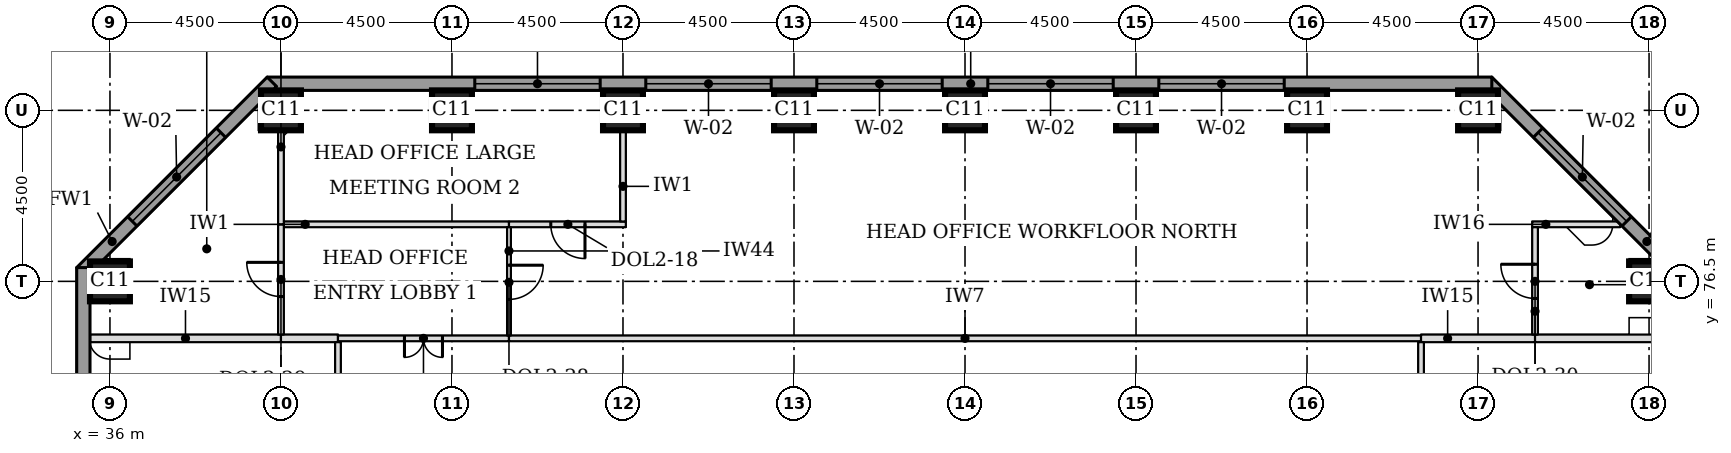
"""IFC4 building model, lengths in metres.
Left out: names, types, materials, properties, quantities, classifications, styles, units other than length and angle.
Written with IfcOpenShell. Run it as: python <this file> out.ifc"""

import sys

from ifc_helpers import new_model, si_unit, direction, frame, frame_2d, origin, origin_2d, place, context, subcontext, project, spatial, rectangle, extrude, element, fill, save


model = new_model("IFC4")
c1 = context("Model", 3, precision=1e-05, world=origin(), true_north=direction((0.0, 1.0)))
c2 = subcontext(c1, "Body", "Model", "MODEL_VIEW")
j1 = project(units=[si_unit("LENGTHUNIT", "METRE"), si_unit("PLANEANGLEUNIT", "RADIAN")], contexts=[c1])
p1 = place(None, origin())
s1 = spatial("IfcSite", under=j1, at=p1, CompositionType="ELEMENT")
p2 = place(p1, origin())
s2 = spatial("IfcBuilding", under=s1, at=p2, CompositionType="ELEMENT")
p3 = place(p2, frame((0.0, 0.0, 86.3)))
s3 = spatial("IfcBuildingStorey", under=s2, at=p3, CompositionType="ELEMENT", Elevation=86.3)
for number, where, z_axis, x_axis in (
    (1, (36.0, 76.5, 0.0), (0.0, 0.0, 1.0), (1.0, 0.0, 0.0)),
    (2, (76.5, 76.5, 0.0), (0.0, 0.0, 1.0), (1.0, 0.0, 0.0)),
    (3, (40.5, 81.0, 0.0), (0.0, 0.0, 1.0), (1.0, 0.0, 0.0)),
    (4, (45.0, 81.0, 0.0), (0.0, 0.0, 1.0), (1.0, 0.0, 0.0)),
    (5, (49.5, 81.0, 0.0), (0.0, 0.0, 1.0), (1.0, 0.0, 0.0)),
    (6, (54.0, 81.0, 0.0), (0.0, 0.0, 1.0), (1.0, 0.0, 0.0)),
    (7, (58.5, 81.0, 0.0), (0.0, 0.0, 1.0), (1.0, 0.0, 0.0)),
    (8, (63.0, 81.0, 0.0), (0.0, 0.0, 1.0), (1.0, 0.0, 0.0)),
    (9, (67.5, 81.0, 0.0), (0.0, 0.0, 1.0), (1.0, 0.0, 0.0)),
    (10, (72.0, 81.0, 0.0), (0.0, 0.0, 1.0), (1.0, 0.0, 0.0)),
):
    element("IfcColumn", number, at=place(p3, frame(where, z_axis=z_axis, x_axis=x_axis)), inside=s3, PredefinedType="COLUMN", context=c2, shape_type="SweptSolid", body=[
        extrude(rectangle(XDim=1.05, YDim=1.05, at=origin_2d()), origin(), (0.0, 0.0, 1.0), 3.7),
    ])
p4 = place(p3, frame((77.251, 76.739, 0.0), z_axis=(0.0, 0.0, 1.0), x_axis=(-0.707106781187, 0.707106781187, 0.0)))
e11 = element("IfcWall", 11, at=p4, inside=s3, PredefinedType="STANDARD", context=c2, shape_type="SweptSolid", body=[
    extrude(rectangle(XDim=7.089, YDim=0.35, at=frame_2d((3.544, 0.0))), origin(), (0.0, 0.0, 1.0), 3.525),
])
p5 = place(p4, frame((1.894, 0.0, 0.9)))
e12 = element("IfcOpeningElement", 12, at=p5, cuts=e11, PredefinedType="OPENING", context=c2, shape_type="SweptSolid", body=[
    extrude(rectangle(XDim=3.3, YDim=1.9, at=frame_2d((1.65, 0.95))), frame((0.0, 0.185, 0.0), z_axis=(0.0, -1.0, 0.0), x_axis=(1.0, 0.0, 0.0)), (0.0, 0.0, 1.0), 0.37),
])
p6 = place(p3, frame((72.362, 81.7, 0.0), z_axis=(0.0, 0.0, 1.0), x_axis=(-1.0, 0.0, 0.0)))
e13 = element("IfcWall", 13, at=p6, inside=s3, PredefinedType="STANDARD", context=c2, shape_type="SweptSolid", body=[
    extrude(rectangle(XDim=32.225, YDim=0.35, at=frame_2d((16.112, 0.0))), origin(), (0.0, 0.0, 1.0), 3.525),
])
p7 = place(p6, frame((5.462, 0.0, 0.9)))
e14 = element("IfcOpeningElement", 14, at=p7, cuts=e13, PredefinedType="OPENING", context=c2, shape_type="SweptSolid", body=[
    extrude(rectangle(XDim=3.3, YDim=1.9, at=frame_2d((1.65, 0.95))), frame((0.0, 0.185, 0.0), z_axis=(0.0, -1.0, 0.0), x_axis=(1.0, 0.0, 0.0)), (0.0, 0.0, 1.0), 0.37),
])
p8 = place(p6, frame((9.962, 0.0, 0.9)))
e15 = element("IfcOpeningElement", 15, at=p8, cuts=e13, PredefinedType="OPENING", context=c2, shape_type="SweptSolid", body=[
    extrude(rectangle(XDim=3.3, YDim=1.9, at=frame_2d((1.65, 0.95))), frame((0.0, 0.185, 0.0), z_axis=(0.0, -1.0, 0.0), x_axis=(1.0, 0.0, 0.0)), (0.0, 0.0, 1.0), 0.37),
])
p9 = place(p6, frame((14.462, 0.0, 0.9)))
e16 = element("IfcOpeningElement", 16, at=p9, cuts=e13, PredefinedType="OPENING", context=c2, shape_type="SweptSolid", body=[
    extrude(rectangle(XDim=3.3, YDim=1.9, at=frame_2d((1.65, 0.95))), frame((0.0, 0.185, 0.0), z_axis=(0.0, -1.0, 0.0), x_axis=(1.0, 0.0, 0.0)), (0.0, 0.0, 1.0), 0.37),
])
p10 = place(p6, frame((18.962, 0.0, 0.9)))
e17 = element("IfcOpeningElement", 17, at=p10, cuts=e13, PredefinedType="OPENING", context=c2, shape_type="SweptSolid", body=[
    extrude(rectangle(XDim=3.3, YDim=1.9, at=frame_2d((1.65, 0.95))), frame((0.0, 0.185, 0.0), z_axis=(0.0, -1.0, 0.0), x_axis=(1.0, 0.0, 0.0)), (0.0, 0.0, 1.0), 0.37),
])
p11 = place(p6, frame((23.462, 0.0, 0.9)))
e18 = element("IfcOpeningElement", 18, at=p11, cuts=e13, PredefinedType="OPENING", context=c2, shape_type="SweptSolid", body=[
    extrude(rectangle(XDim=3.3, YDim=1.9, at=frame_2d((1.65, 0.95))), frame((0.0, 0.185, 0.0), z_axis=(0.0, -1.0, 0.0), x_axis=(1.0, 0.0, 0.0)), (0.0, 0.0, 1.0), 0.37),
])
p12 = place(p3, frame((40.261, 81.751, 0.0), z_axis=(0.0, 0.0, 1.0), x_axis=(-0.707106781187, -0.707106781187, 0.0)))
e19 = element("IfcWall", 19, at=p12, inside=s3, PredefinedType="STANDARD", context=c2, shape_type="SweptSolid", body=[
    extrude(rectangle(XDim=7.089, YDim=0.35, at=frame_2d((3.544, 0.0))), origin(), (0.0, 0.0, 1.0), 3.525),
])
p13 = place(p12, frame((1.894, 0.0, 0.9)))
e20 = element("IfcOpeningElement", 20, at=p13, cuts=e19, PredefinedType="OPENING", context=c2, shape_type="SweptSolid", body=[
    extrude(rectangle(XDim=3.3, YDim=1.9, at=frame_2d((1.65, 0.95))), frame((0.0, 0.185, 0.0), z_axis=(0.0, -1.0, 0.0), x_axis=(1.0, 0.0, 0.0)), (0.0, 0.0, 1.0), 0.37),
])
p14 = place(p3, frame((35.3, 76.862, 0.0), z_axis=(0.0, 0.0, 1.0), x_axis=(0.0, -1.0, 0.0)))
e21 = element("IfcWall", 21, at=p14, inside=s3, PredefinedType="STANDARD", context=c2, shape_type="SweptSolid", body=[
    extrude(rectangle(XDim=13.337, YDim=0.35, at=frame_2d((6.669, 0.0))), origin(), (0.0, 0.0, 1.0), 3.525),
])
p15 = place(p14, frame((9.537, 0.0, 0.9)))
e22 = element("IfcOpeningElement", 22, at=p15, cuts=e21, PredefinedType="OPENING", context=c2, shape_type="SweptSolid", body=[
    extrude(rectangle(XDim=3.3, YDim=1.9, at=frame_2d((1.65, 0.95))), frame((0.0, 0.185, 0.0), z_axis=(0.0, -1.0, 0.0), x_axis=(1.0, 0.0, 0.0)), (0.0, 0.0, 1.0), 0.37),
])
p16 = place(p3, frame((35.475, 75.0, 0.0), z_axis=(0.0, 0.0, 1.0), x_axis=(1.0, 0.0, 0.0)))
e23 = element("IfcWall", 23, at=p16, inside=s3, PredefinedType="PARTITIONING", context=c2, shape_type="SweptSolid", body=[
    extrude(rectangle(XDim=5.025, YDim=0.2, at=frame_2d((2.512, 0.0))), origin(), (0.0, 0.0, 1.0), 3.55),
])
p17 = place(p3, frame((40.5, 75.0, 0.0), z_axis=(0.0, 0.0, 1.0), x_axis=(1.0, 0.0, 0.0)))
e24 = element("IfcWall", 24, at=p17, inside=s3, PredefinedType="PARTITIONING", context=c2, shape_type="SweptSolid", body=[
    extrude(rectangle(XDim=1.5, YDim=0.2, at=frame_2d((0.75, 0.0))), origin(), (0.0, 0.0, 1.0), 3.55),
])
p18 = place(p3, frame((42.0, 75.0, 0.0), z_axis=(0.0, 0.0, 1.0), x_axis=(1.0, 0.0, 0.0)))
e25 = element("IfcWall", 25, at=p18, inside=s3, PredefinedType="PARTITIONING", context=c2, shape_type="SweptSolid", body=[
    extrude(rectangle(XDim=4.5, YDim=0.15, at=frame_2d((2.25, 0.0))), origin(), (0.0, 0.0, 1.0), 3.55),
])
p19 = place(p18, frame((1.75, 0.0, 0.0)))
e26 = element("IfcOpeningElement", 26, at=p19, cuts=e25, PredefinedType="OPENING", context=c2, shape_type="SweptSolid", body=[
    extrude(rectangle(XDim=1.0, YDim=2.1, at=frame_2d((0.5, 1.05))), frame((0.0, 0.085, 0.0), z_axis=(0.0, -1.0, 0.0), x_axis=(1.0, 0.0, 0.0)), (0.0, 0.0, 1.0), 0.17),
])
p20 = place(p3, frame((46.5, 75.0, 0.0), z_axis=(0.0, 0.0, 1.0), x_axis=(1.0, 0.0, 0.0)))
e27 = element("IfcWall", 27, at=p20, inside=s3, PredefinedType="PARTITIONING", context=c2, shape_type="SweptSolid", body=[
    extrude(rectangle(XDim=24.0, YDim=0.15, at=frame_2d((12.0, 0.0))), origin(), (0.0, 0.0, 1.0), 3.55),
])
p21 = place(p3, frame((70.5, 75.0, 0.0), z_axis=(0.0, 0.0, 1.0), x_axis=(1.0, 0.0, 0.0)))
e28 = element("IfcWall", 28, at=p21, inside=s3, PredefinedType="PARTITIONING", context=c2, shape_type="SweptSolid", body=[
    extrude(rectangle(XDim=3.0, YDim=0.2, at=frame_2d((1.5, 0.0))), origin(), (0.0, 0.0, 1.0), 3.55),
])
p22 = place(p3, frame((73.5, 75.0, 0.0), z_axis=(0.0, 0.0, 1.0), x_axis=(1.0, 0.0, 0.0)))
e29 = element("IfcWall", 29, at=p22, inside=s3, PredefinedType="PARTITIONING", context=c2, shape_type="SweptSolid", body=[
    extrude(rectangle(XDim=3.525, YDim=0.2, at=frame_2d((1.762, 0.0))), origin(), (0.0, 0.0, 1.0), 3.55),
])
p23 = place(p3, frame((40.575, 78.0, 0.0), z_axis=(0.0, 0.0, 1.0), x_axis=(1.0, 0.0, 0.0)))
e30 = element("IfcWall", 30, at=p23, inside=s3, PredefinedType="PARTITIONING", context=c2, shape_type="SweptSolid", body=[
    extrude(rectangle(XDim=5.925, YDim=0.15, at=frame_2d((2.962, 0.0))), origin(), (0.0, 0.0, 1.0), 3.55),
])
p24 = place(p3, frame((46.5, 78.0, 0.0), z_axis=(0.0, 0.0, 1.0), x_axis=(1.0, 0.0, 0.0)))
e31 = element("IfcWall", 31, at=p24, inside=s3, PredefinedType="PARTITIONING", context=c2, shape_type="SweptSolid", body=[
    extrude(rectangle(XDim=3.075, YDim=0.15, at=frame_2d((1.538, 0.0))), origin(), (0.0, 0.0, 1.0), 3.55),
])
p25 = place(p24, frame((1.1, 0.0, 0.0)))
e32 = element("IfcOpeningElement", 32, at=p25, cuts=e31, PredefinedType="OPENING", context=c2, shape_type="SweptSolid", body=[
    extrude(rectangle(XDim=0.9, YDim=2.1, at=frame_2d((0.45, 1.05))), frame((0.0, 0.085, 0.0), z_axis=(0.0, -1.0, 0.0), x_axis=(1.0, 0.0, 0.0)), (0.0, 0.0, 1.0), 0.17),
])
p26 = place(p3, frame((73.425, 78.0, 0.0), z_axis=(0.0, 0.0, 1.0), x_axis=(1.0, 0.0, 0.0)))
e33 = element("IfcWall", 33, at=p26, inside=s3, PredefinedType="PARTITIONING", context=c2, shape_type="SweptSolid", body=[
    extrude(rectangle(XDim=2.317, YDim=0.15, at=frame_2d((1.159, 0.0))), origin(), (0.0, 0.0, 1.0), 3.55),
])
p27 = place(p3, frame((70.5, 46.6, 0.0), z_axis=(0.0, 0.0, 1.0), x_axis=(0.0, 1.0, 0.0)))
e34 = element("IfcWall", 34, at=p27, inside=s3, PredefinedType="PARTITIONING", context=c2, shape_type="SweptSolid", body=[
    extrude(rectangle(XDim=28.3, YDim=0.15, at=frame_2d((14.15, 0.0))), origin(), (0.0, 0.0, 1.0), 3.55),
])
p28 = place(p27, frame((13.65, 0.0, 0.0)))
e35 = element("IfcOpeningElement", 35, at=p28, cuts=e34, PredefinedType="OPENING", context=c2, shape_type="SweptSolid", body=[
    extrude(rectangle(XDim=1.0, YDim=2.1, at=frame_2d((0.5, 1.05))), frame((0.0, 0.085, 0.0), z_axis=(0.0, -1.0, 0.0), x_axis=(1.0, 0.0, 0.0)), (0.0, 0.0, 1.0), 0.17),
])
p29 = place(p3, frame((42.0, 57.075, 0.0), z_axis=(0.0, 0.0, 1.0), x_axis=(0.0, 1.0, 0.0)))
e36 = element("IfcWall", 36, at=p29, inside=s3, PredefinedType="PARTITIONING", context=c2, shape_type="SweptSolid", body=[
    extrude(rectangle(XDim=17.825, YDim=0.15, at=frame_2d((8.913, 0.0))), origin(), (0.0, 0.0, 1.0), 3.55),
])
p30 = place(p3, frame((46.5, 75.075, 0.0), z_axis=(0.0, 0.0, 1.0), x_axis=(0.0, 1.0, 0.0)))
e37 = element("IfcWall", 37, at=p30, inside=s3, PredefinedType="PARTITIONING", context=c2, shape_type="SweptSolid", body=[
    extrude(rectangle(XDim=2.85, YDim=0.1, at=frame_2d((1.425, 0.0))), origin(), (0.0, 0.0, 1.0), 3.022),
])
p31 = place(p30, frame((0.95, 0.0, 0.0)))
e38 = element("IfcOpeningElement", 38, at=p31, cuts=e37, PredefinedType="OPENING", context=c2, shape_type="SweptSolid", body=[
    extrude(rectangle(XDim=0.9, YDim=2.1, at=frame_2d((0.45, 1.05))), frame((0.0, 0.06, 0.0), z_axis=(0.0, -1.0, 0.0), x_axis=(1.0, 0.0, 0.0)), (0.0, 0.0, 1.0), 0.12),
])
p32 = place(p3, frame((40.5, 75.1, 0.0), z_axis=(0.0, 0.0, 1.0), x_axis=(0.0, 1.0, 0.0)))
e39 = element("IfcWall", 39, at=p32, inside=s3, PredefinedType="PARTITIONING", context=c2, shape_type="SweptSolid", body=[
    extrude(rectangle(XDim=2.9, YDim=0.15, at=frame_2d((1.45, 0.0))), origin(), (0.0, 0.0, 1.0), 3.55),
])
p33 = place(p32, frame((1.0, 0.0, 0.0)))
e40 = element("IfcOpeningElement", 40, at=p33, cuts=e39, PredefinedType="OPENING", context=c2, shape_type="SweptSolid", body=[
    extrude(rectangle(XDim=0.9, YDim=2.1, at=frame_2d((0.45, 1.05))), frame((0.0, 0.085, 0.0), z_axis=(0.0, -1.0, 0.0), x_axis=(1.0, 0.0, 0.0)), (0.0, 0.0, 1.0), 0.17),
])
p34 = place(p3, frame((73.5, 75.1, 0.0), z_axis=(0.0, 0.0, 1.0), x_axis=(0.0, 1.0, 0.0)))
e41 = element("IfcWall", 41, at=p34, inside=s3, PredefinedType="PARTITIONING", context=c2, shape_type="SweptSolid", body=[
    extrude(rectangle(XDim=2.825, YDim=0.15, at=frame_2d((1.413, 0.0))), origin(), (0.0, 0.0, 1.0), 3.55),
])
p35 = place(p34, frame((0.95, 0.0, 0.0)))
e42 = element("IfcOpeningElement", 42, at=p35, cuts=e41, PredefinedType="OPENING", context=c2, shape_type="SweptSolid", body=[
    extrude(rectangle(XDim=0.9, YDim=2.1, at=frame_2d((0.45, 1.05))), frame((0.0, 0.085, 0.0), z_axis=(0.0, -1.0, 0.0), x_axis=(1.0, 0.0, 0.0)), (0.0, 0.0, 1.0), 0.17),
])
p36 = place(p3, frame((40.5, 78.0, 0.0), z_axis=(0.0, 0.0, 1.0), x_axis=(0.0, 1.0, 0.0)))
e43 = element("IfcWall", 43, at=p36, inside=s3, PredefinedType="PARTITIONING", context=c2, shape_type="SweptSolid", body=[
    extrude(rectangle(XDim=2.475, YDim=0.15, at=frame_2d((1.238, 0.0))), origin(), (0.0, 0.0, 1.0), 3.55),
])
p37 = place(p3, frame((49.5, 78.075, 0.0), z_axis=(0.0, 0.0, 1.0), x_axis=(0.0, 1.0, 0.0)))
e44 = element("IfcWall", 44, at=p37, inside=s3, PredefinedType="PARTITIONING", context=c2, shape_type="SweptSolid", body=[
    extrude(rectangle(XDim=3.45, YDim=0.15, at=frame_2d((1.725, 0.0))), origin(), (0.0, 0.0, 1.0), 3.55),
])
p38 = place(p5, origin())
e45 = element("IfcWindow", 45, at=p38, inside=s3, PartitioningType="SINGLE_PANEL", PredefinedType="WINDOW", context=c2, shape_type="SweptSolid", body=[
    extrude(rectangle(XDim=3.3, YDim=1.9, at=frame_2d((1.65, 0.95))), frame((0.0, 0.085, 0.0), z_axis=(0.0, -1.0, 0.0), x_axis=(1.0, 0.0, 0.0)), (0.0, 0.0, 1.0), 0.06),
])
fill(e12, e45)
p39 = place(p7, origin())
e46 = element("IfcWindow", 46, at=p39, inside=s3, PartitioningType="SINGLE_PANEL", PredefinedType="WINDOW", context=c2, shape_type="SweptSolid", body=[
    extrude(rectangle(XDim=3.3, YDim=1.9, at=frame_2d((1.65, 0.95))), frame((0.0, 0.085, 0.0), z_axis=(0.0, -1.0, 0.0), x_axis=(1.0, 0.0, 0.0)), (0.0, 0.0, 1.0), 0.06),
])
fill(e14, e46)
p40 = place(p8, origin())
e47 = element("IfcWindow", 47, at=p40, inside=s3, PartitioningType="SINGLE_PANEL", PredefinedType="WINDOW", context=c2, shape_type="SweptSolid", body=[
    extrude(rectangle(XDim=3.3, YDim=1.9, at=frame_2d((1.65, 0.95))), frame((0.0, 0.085, 0.0), z_axis=(0.0, -1.0, 0.0), x_axis=(1.0, 0.0, 0.0)), (0.0, 0.0, 1.0), 0.06),
])
fill(e15, e47)
p41 = place(p9, origin())
e48 = element("IfcWindow", 48, at=p41, inside=s3, PartitioningType="SINGLE_PANEL", PredefinedType="WINDOW", context=c2, shape_type="SweptSolid", body=[
    extrude(rectangle(XDim=3.3, YDim=1.9, at=frame_2d((1.65, 0.95))), frame((0.0, 0.085, 0.0), z_axis=(0.0, -1.0, 0.0), x_axis=(1.0, 0.0, 0.0)), (0.0, 0.0, 1.0), 0.06),
])
fill(e16, e48)
p42 = place(p10, origin())
e49 = element("IfcWindow", 49, at=p42, inside=s3, PartitioningType="SINGLE_PANEL", PredefinedType="WINDOW", context=c2, shape_type="SweptSolid", body=[
    extrude(rectangle(XDim=3.3, YDim=1.9, at=frame_2d((1.65, 0.95))), frame((0.0, 0.085, 0.0), z_axis=(0.0, -1.0, 0.0), x_axis=(1.0, 0.0, 0.0)), (0.0, 0.0, 1.0), 0.06),
])
fill(e17, e49)
p43 = place(p11, origin())
e50 = element("IfcWindow", 50, at=p43, inside=s3, PartitioningType="SINGLE_PANEL", PredefinedType="WINDOW", context=c2, shape_type="SweptSolid", body=[
    extrude(rectangle(XDim=3.3, YDim=1.9, at=frame_2d((1.65, 0.95))), frame((0.0, 0.085, 0.0), z_axis=(0.0, -1.0, 0.0), x_axis=(1.0, 0.0, 0.0)), (0.0, 0.0, 1.0), 0.06),
])
fill(e18, e50)
p44 = place(p13, origin())
e51 = element("IfcWindow", 51, at=p44, inside=s3, PartitioningType="SINGLE_PANEL", PredefinedType="WINDOW", context=c2, shape_type="SweptSolid", body=[
    extrude(rectangle(XDim=3.3, YDim=1.9, at=frame_2d((1.65, 0.95))), frame((0.0, 0.085, 0.0), z_axis=(0.0, -1.0, 0.0), x_axis=(1.0, 0.0, 0.0)), (0.0, 0.0, 1.0), 0.06),
])
fill(e20, e51)
p45 = place(p19, frame((1.0, 0.0, 0.0), z_axis=(0.0, 0.0, 1.0), x_axis=(-1.0, 0.0, 0.0)))
e52 = element("IfcDoor", 52, at=p45, inside=s3, OperationType="DOUBLE_DOOR_SINGLE_SWING", PredefinedType="DOOR", context=c2, shape_type="SweptSolid", body=[
    extrude(rectangle(XDim=1.0, YDim=2.1, at=frame_2d((0.5, 1.05))), frame((0.0, 0.025, 0.0), z_axis=(0.0, -1.0, 0.0), x_axis=(1.0, 0.0, 0.0)), (0.0, 0.0, 1.0), 0.05),
])
fill(e26, e52)
p46 = place(p31, frame((0.9, 0.0, 0.0), z_axis=(0.0, 0.0, 1.0), x_axis=(-1.0, 0.0, 0.0)))
e53 = element("IfcDoor", 53, at=p46, inside=s3, OperationType="SINGLE_SWING_LEFT", PredefinedType="DOOR", context=c2, shape_type="SweptSolid", body=[
    extrude(rectangle(XDim=0.9, YDim=2.1, at=frame_2d((0.45, 1.05))), frame((0.0, 0.025, 0.0), z_axis=(0.0, -1.0, 0.0), x_axis=(1.0, 0.0, 0.0)), (0.0, 0.0, 1.0), 0.05),
])
fill(e38, e53)
p47 = place(p35, origin())
e54 = element("IfcDoor", 54, at=p47, inside=s3, OperationType="SINGLE_SWING_RIGHT", PredefinedType="DOOR", context=c2, shape_type="SweptSolid", body=[
    extrude(rectangle(XDim=0.9, YDim=2.1, at=frame_2d((0.45, 1.05))), frame((0.0, 0.025, 0.0), z_axis=(0.0, -1.0, 0.0), x_axis=(1.0, 0.0, 0.0)), (0.0, 0.0, 1.0), 0.05),
])
fill(e42, e54)
p48 = place(p33, origin())
e55 = element("IfcDoor", 55, at=p48, inside=s3, OperationType="SINGLE_SWING_RIGHT", PredefinedType="DOOR", context=c2, shape_type="SweptSolid", body=[
    extrude(rectangle(XDim=0.9, YDim=2.1, at=frame_2d((0.45, 1.05))), frame((0.0, 0.025, 0.0), z_axis=(0.0, -1.0, 0.0), x_axis=(1.0, 0.0, 0.0)), (0.0, 0.0, 1.0), 0.05),
])
fill(e40, e55)
p49 = place(p25, frame((0.9, 0.0, 0.0), z_axis=(0.0, 0.0, 1.0), x_axis=(-1.0, 0.0, 0.0)))
e56 = element("IfcDoor", 56, at=p49, inside=s3, OperationType="SINGLE_SWING_LEFT", PredefinedType="DOOR", context=c2, shape_type="SweptSolid", body=[
    extrude(rectangle(XDim=0.9, YDim=2.1, at=frame_2d((0.45, 1.05))), frame((0.0, 0.025, 0.0), z_axis=(0.0, -1.0, 0.0), x_axis=(1.0, 0.0, 0.0)), (0.0, 0.0, 1.0), 0.05),
])
fill(e32, e56)
save(model, sys.argv[1])
